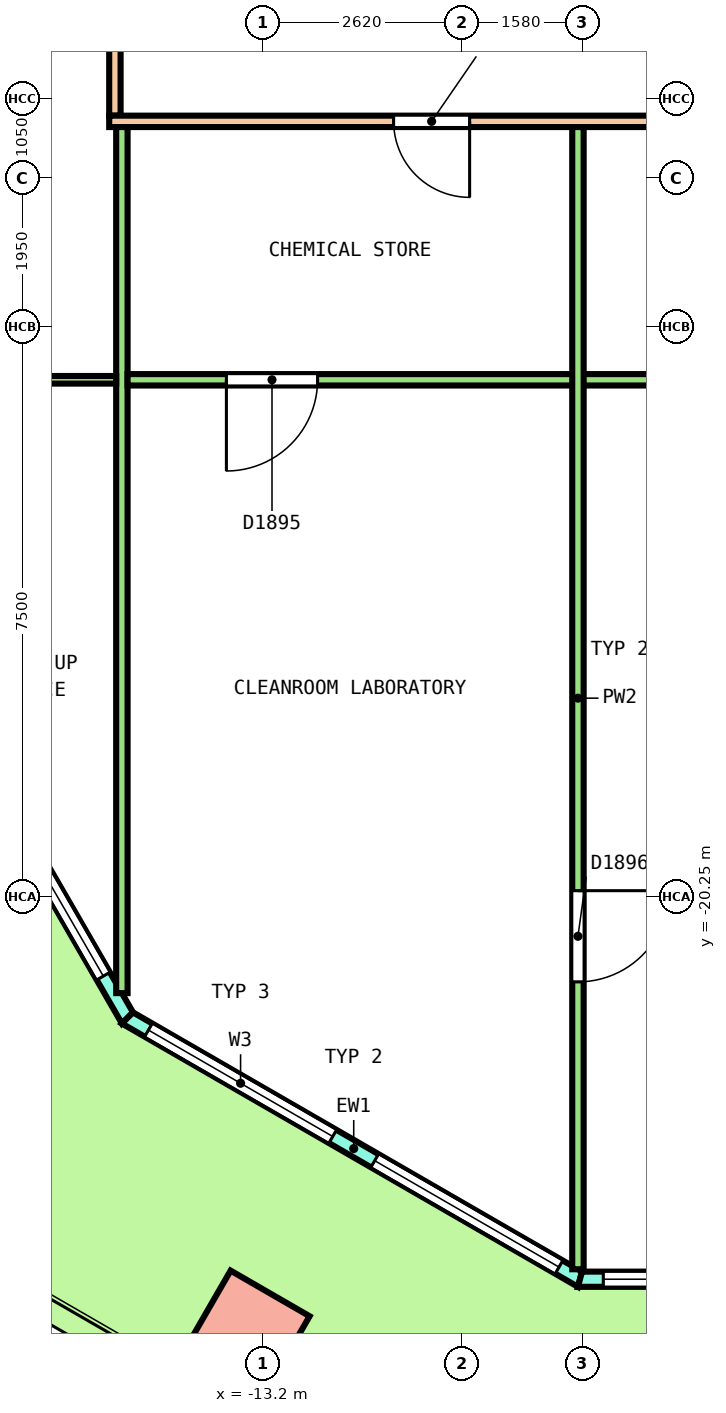
"""IFC4 building model, lengths in metres.
Left out: names, types, materials, properties, quantities, classifications, styles, units other than length and angle.
Written with IfcOpenShell. Run it as: python <this file> out.ifc"""

import sys

from ifc_helpers import new_model, si_unit, direction, frame, frame_2d, origin, origin_2d, place, context, subcontext, project, spatial, polyline, rectangle, outline, extrude, element, fill, save


model = new_model("IFC4")
c1 = context("Model", 3, precision=1e-05, world=origin(), true_north=direction((0.0, 1.0)))
c2 = subcontext(c1, "Body", "Model", "MODEL_VIEW")
j1 = project(units=[si_unit("LENGTHUNIT", "METRE"), si_unit("PLANEANGLEUNIT", "RADIAN")], contexts=[c1])
p1 = place(None, origin())
s1 = spatial("IfcSite", under=j1, at=p1, CompositionType="ELEMENT")
p2 = place(p1, origin())
s2 = spatial("IfcBuilding", under=s1, at=p2, CompositionType="ELEMENT")
p3 = place(p2, frame((0.0, 0.0, 189.2)))
s3 = spatial("IfcBuildingStorey", under=s2, at=p3, CompositionType="ELEMENT", Elevation=189.2)
p4 = place(p3, frame((-13.408, -25.989, 0.0), z_axis=(0.0, 0.0, 1.0), x_axis=(0.866025403784, -0.5, 0.0)))
e1 = element("IfcColumn", 1, at=p4, inside=s3, PredefinedType="COLUMN", context=c2, shape_type="SweptSolid", body=[
    extrude(rectangle(XDim=1.2, YDim=1.2, at=origin_2d()), origin(), (0.0, 0.0, 1.0), 4.05),
])
p5 = place(p3, frame((-26.411, -2.055, 0.0), z_axis=(0.0, 0.0, 1.0), x_axis=(0.50000204422, -0.86602422355, 0.0)))
e2 = element("IfcWall", 2, at=p5, inside=s3, PredefinedType="SOLIDWALL", context=c2, shape_type="SweptSolid", body=[
    extrude(outline(polyline([(-0.027, -0.1), (1.014, -0.1), (2.055, -0.1), (3.097, -0.1), (4.138, -0.1), (5.179, -0.1), (6.22, -0.1), (7.261, -0.1), (8.303, -0.1), (9.344, -0.1), (10.385, -0.1), (11.426, -0.1), (12.468, -0.1), (13.509, -0.1), (14.55, -0.1), (15.591, -0.1), (16.632, -0.1), (17.673, -0.1), (18.715, -0.1), (19.756, -0.1), (20.797, -0.1), (21.838, -0.1), (22.879, -0.1), (22.826, 0.1), (21.789, 0.1), (20.753, 0.1), (19.717, 0.1), (18.68, 0.1), (17.644, 0.1), (16.608, 0.1), (15.572, 0.1), (14.535, 0.1), (13.499, 0.1), (12.463, 0.1), (11.426, 0.1), (10.39, 0.1), (9.354, 0.1), (8.317, 0.1), (7.281, 0.1), (6.245, 0.1), (5.208, 0.1), (4.172, 0.1), (3.136, 0.1), (2.099, 0.1), (1.063, 0.1), (0.027, 0.1), (-0.027, -0.1)])), origin(), (0.0, 0.0, 1.0), 4.1),
])
p6 = place(p5, frame((0.635, 0.0, 0.1)))
e3 = element("IfcOpeningElement", 3, at=p6, cuts=e2, PredefinedType="OPENING", context=c2, shape_type="SweptSolid", body=[
    extrude(rectangle(XDim=3.3, YDim=2.9, at=frame_2d((1.65, 1.45))), frame((0.0, 0.11, 0.0), z_axis=(0.0, -1.0, 0.0), x_axis=(1.0, 0.0, 0.0)), (0.0, 0.0, 1.0), 0.22),
])
p7 = place(p5, frame((5.206, 0.0, 0.1)))
e4 = element("IfcOpeningElement", 4, at=p7, cuts=e2, PredefinedType="OPENING", context=c2, shape_type="SweptSolid", body=[
    extrude(rectangle(XDim=3.3, YDim=2.9, at=frame_2d((1.65, 1.45))), frame((0.0, 0.11, 0.0), z_axis=(0.0, -1.0, 0.0), x_axis=(1.0, 0.0, 0.0)), (0.0, 0.0, 1.0), 0.22),
])
p8 = place(p5, frame((10.526, 0.0, 0.0)))
e5 = element("IfcOpeningElement", 5, at=p8, cuts=e2, PredefinedType="OPENING", context=c2, shape_type="SweptSolid", body=[
    extrude(rectangle(XDim=1.8, YDim=2.4, at=frame_2d((0.9, 1.2))), frame((0.0, 0.11, 0.0), z_axis=(0.0, -1.0, 0.0), x_axis=(1.0, 0.0, 0.0)), (0.0, 0.0, 1.0), 0.22),
])
p9 = place(p5, frame((10.526, 0.0, 2.55)))
e6 = element("IfcOpeningElement", 6, at=p9, cuts=e2, PredefinedType="OPENING", context=c2, shape_type="SweptSolid", body=[
    extrude(rectangle(XDim=1.8, YDim=0.45, at=frame_2d((0.9, 0.225))), frame((0.0, 0.11, 0.0), z_axis=(0.0, -1.0, 0.0), x_axis=(1.0, 0.0, 0.0)), (0.0, 0.0, 1.0), 0.22),
])
p10 = place(p5, frame((14.347, 0.0, 0.1)))
e7 = element("IfcOpeningElement", 7, at=p10, cuts=e2, PredefinedType="OPENING", context=c2, shape_type="SweptSolid", body=[
    extrude(rectangle(XDim=3.3, YDim=2.9, at=frame_2d((1.65, 1.45))), frame((0.0, 0.11, 0.0), z_axis=(0.0, -1.0, 0.0), x_axis=(1.0, 0.0, 0.0)), (0.0, 0.0, 1.0), 0.22),
])
p11 = place(p5, frame((18.917, 0.0, 0.1)))
e8 = element("IfcOpeningElement", 8, at=p11, cuts=e2, PredefinedType="OPENING", context=c2, shape_type="SweptSolid", body=[
    extrude(rectangle(XDim=3.3, YDim=2.9, at=frame_2d((1.65, 1.45))), frame((0.0, 0.11, 0.0), z_axis=(0.0, -1.0, 0.0), x_axis=(1.0, 0.0, 0.0)), (0.0, 0.0, 1.0), 0.22),
])
p12 = place(p3, frame((-14.985, -21.845, 0.0), z_axis=(0.0, 0.0, 1.0), x_axis=(0.866029458321, -0.49999297727, 0.0)))
e9 = element("IfcWall", 9, at=p12, inside=s3, PredefinedType="SOLIDWALL", context=c2, shape_type="SweptSolid", body=[
    extrude(outline(polyline([(-0.027, -0.1), (1.128, -0.1), (2.282, -0.1), (3.437, -0.1), (4.592, -0.1), (5.747, -0.1), (6.901, -0.1), (6.848, 0.1), (5.711, 0.1), (4.574, 0.1), (3.437, 0.1), (2.301, 0.1), (1.164, 0.1), (0.027, 0.1), (-0.027, -0.1)])), origin(), (0.0, 0.0, 1.0), 4.1),
])
p13 = place(p12, frame((0.319, 0.0, 0.1)))
e10 = element("IfcOpeningElement", 10, at=p13, cuts=e9, PredefinedType="OPENING", context=c2, shape_type="SweptSolid", body=[
    extrude(rectangle(XDim=2.8, YDim=2.9, at=frame_2d((1.4, 1.45))), frame((0.0, 0.11, 0.0), z_axis=(0.0, -1.0, 0.0), x_axis=(1.0, 0.0, 0.0)), (0.0, 0.0, 1.0), 0.22),
])
p14 = place(p12, frame((3.756, 0.0, 0.1)))
e11 = element("IfcOpeningElement", 11, at=p14, cuts=e9, PredefinedType="OPENING", context=c2, shape_type="SweptSolid", body=[
    extrude(rectangle(XDim=2.8, YDim=2.9, at=frame_2d((1.4, 1.45))), frame((0.0, 0.11, 0.0), z_axis=(0.0, -1.0, 0.0), x_axis=(1.0, 0.0, 0.0)), (0.0, 0.0, 1.0), 0.22),
])
p15 = place(p3, frame((-9.031, -25.283, 0.0), z_axis=(0.0, 0.0, 1.0), x_axis=(1.0, 0.0, 0.0)))
e12 = element("IfcWall", 12, at=p15, inside=s3, PredefinedType="SOLIDWALL", context=c2, shape_type="SweptSolid", body=[
    extrude(outline(polyline([(-0.027, -0.1), (0.979, -0.1), (1.986, -0.1), (2.992, -0.1), (3.999, -0.1), (5.005, -0.1), (6.012, -0.1), (7.018, -0.1), (8.025, -0.1), (9.031, -0.1), (10.038, -0.1), (11.044, -0.1), (12.051, -0.1), (13.057, -0.1), (14.063, -0.1), (15.07, -0.1), (16.076, -0.1), (17.083, -0.1), (18.089, -0.1), (18.036, 0.1), (17.035, 0.1), (16.035, 0.1), (15.034, 0.1), (14.034, 0.1), (13.033, 0.1), (12.033, 0.1), (11.032, 0.1), (10.032, 0.1), (9.031, 0.1), (8.031, 0.1), (7.03, 0.1), (6.03, 0.1), (5.029, 0.1), (4.029, 0.1), (3.028, 0.1), (2.028, 0.1), (1.027, 0.1), (0.027, 0.1), (-0.027, -0.1)])), origin(), (0.0, 0.0, 1.0), 4.1),
])
p16 = place(p15, frame((0.306, 0.0, 0.1)))
e13 = element("IfcOpeningElement", 13, at=p16, cuts=e12, PredefinedType="OPENING", context=c2, shape_type="SweptSolid", body=[
    extrude(rectangle(XDim=3.0, YDim=2.9, at=frame_2d((1.5, 1.45))), frame((0.0, 0.11, 0.0), z_axis=(0.0, -1.0, 0.0), x_axis=(1.0, 0.0, 0.0)), (0.0, 0.0, 1.0), 0.22),
])
p17 = place(p15, frame((3.919, 0.0, 0.1)))
e14 = element("IfcOpeningElement", 14, at=p17, cuts=e12, PredefinedType="OPENING", context=c2, shape_type="SweptSolid", body=[
    extrude(rectangle(XDim=3.0, YDim=2.9, at=frame_2d((1.5, 1.45))), frame((0.0, 0.11, 0.0), z_axis=(0.0, -1.0, 0.0), x_axis=(1.0, 0.0, 0.0)), (0.0, 0.0, 1.0), 0.22),
])
p18 = place(p15, frame((8.131, 0.0, 0.0)))
e15 = element("IfcOpeningElement", 15, at=p18, cuts=e12, PredefinedType="OPENING", context=c2, shape_type="SweptSolid", body=[
    extrude(rectangle(XDim=1.8, YDim=2.4, at=frame_2d((0.9, 1.2))), frame((0.0, 0.11, 0.0), z_axis=(0.0, -1.0, 0.0), x_axis=(1.0, 0.0, 0.0)), (0.0, 0.0, 1.0), 0.22),
])
p19 = place(p15, frame((8.131, 0.0, 2.55)))
e16 = element("IfcOpeningElement", 16, at=p19, cuts=e12, PredefinedType="OPENING", context=c2, shape_type="SweptSolid", body=[
    extrude(rectangle(XDim=1.8, YDim=0.45, at=frame_2d((0.9, 0.225))), frame((0.0, 0.11, 0.0), z_axis=(0.0, -1.0, 0.0), x_axis=(1.0, 0.0, 0.0)), (0.0, 0.0, 1.0), 0.22),
])
p20 = place(p15, frame((11.144, 0.0, 0.1)))
e17 = element("IfcOpeningElement", 17, at=p20, cuts=e12, PredefinedType="OPENING", context=c2, shape_type="SweptSolid", body=[
    extrude(rectangle(XDim=3.0, YDim=2.9, at=frame_2d((1.5, 1.45))), frame((0.0, 0.11, 0.0), z_axis=(0.0, -1.0, 0.0), x_axis=(1.0, 0.0, 0.0)), (0.0, 0.0, 1.0), 0.22),
])
p21 = place(p15, frame((14.756, 0.0, 0.1)))
e18 = element("IfcOpeningElement", 18, at=p21, cuts=e12, PredefinedType="OPENING", context=c2, shape_type="SweptSolid", body=[
    extrude(rectangle(XDim=3.0, YDim=2.9, at=frame_2d((1.5, 1.45))), frame((0.0, 0.11, 0.0), z_axis=(0.0, -1.0, 0.0), x_axis=(1.0, 0.0, 0.0)), (0.0, 0.0, 1.0), 0.22),
])
p22 = place(p3, frame((-15.15, -9.975, 0.0), z_axis=(0.0, 0.0, 1.0), x_axis=(0.0, 1.0, 0.0)))
e19 = element("IfcWall", 19, at=p22, inside=s3, PredefinedType="PARTITIONING", context=c2, shape_type="SweptSolid", body=[
    extrude(rectangle(XDim=8.701, YDim=0.15, at=frame_2d((4.35, 0.0))), origin(), (0.0, 0.0, 1.0), 3.05),
])
p23 = place(p22, frame((1.771, 0.0, 0.0)))
e20 = element("IfcOpeningElement", 20, at=p23, cuts=e19, PredefinedType="OPENING", context=c2, shape_type="SweptSolid", body=[
    extrude(rectangle(XDim=1.0, YDim=2.1, at=frame_2d((0.5, 1.05))), frame((0.0, 0.085, 0.0), z_axis=(0.0, -1.0, 0.0), x_axis=(1.0, 0.0, 0.0)), (0.0, 0.0, 1.0), 0.17),
])
p24 = place(p3, frame((-15.225, -10.05, 0.0), z_axis=(0.0, 0.0, 1.0), x_axis=(1.0, 0.0, 0.0)))
e21 = element("IfcWall", 21, at=p24, inside=s3, PredefinedType="PARTITIONING", context=c2, shape_type="SweptSolid", body=[
    extrude(rectangle(XDim=30.325, YDim=0.15, at=frame_2d((15.163, 0.0))), origin(), (0.0, 0.0, 1.0), 3.05),
])
p25 = place(p24, frame((3.742, 0.0, 0.0)))
e22 = element("IfcOpeningElement", 22, at=p25, cuts=e21, PredefinedType="OPENING", context=c2, shape_type="SweptSolid", body=[
    extrude(rectangle(XDim=1.0, YDim=2.1, at=frame_2d((0.5, 1.05))), frame((0.0, 0.085, 0.0), z_axis=(0.0, -1.0, 0.0), x_axis=(1.0, 0.0, 0.0)), (0.0, 0.0, 1.0), 0.17),
])
p26 = place(p24, frame((12.193, 0.0, 0.0)))
e23 = element("IfcOpeningElement", 23, at=p26, cuts=e21, PredefinedType="OPENING", context=c2, shape_type="SweptSolid", body=[
    extrude(rectangle(XDim=1.2, YDim=2.1, at=frame_2d((0.6, 1.05))), frame((0.0, 0.085, 0.0), z_axis=(0.0, -1.0, 0.0), x_axis=(1.0, 0.0, 0.0)), (0.0, 0.0, 1.0), 0.17),
])
p27 = place(p24, frame((26.829, 0.0, 0.0)))
e24 = element("IfcOpeningElement", 24, at=p27, cuts=e21, PredefinedType="OPENING", context=c2, shape_type="SweptSolid", body=[
    extrude(rectangle(XDim=1.0, YDim=2.1, at=frame_2d((0.5, 1.05))), frame((0.0, 0.085, 0.0), z_axis=(0.0, -1.0, 0.0), x_axis=(1.0, 0.0, 0.0)), (0.0, 0.0, 1.0), 0.17),
])
p28 = place(p3, frame((-15.058, -21.519, 0.0), z_axis=(0.0, 0.0, 1.0), x_axis=(0.0, 1.0, 0.0)))
e25 = element("IfcWall", 25, at=p28, inside=s3, PredefinedType="PARTITIONING", context=c2, shape_type="SweptSolid", body=[
    extrude(rectangle(XDim=11.394, YDim=0.15, at=frame_2d((5.697, 0.0))), origin(), (0.0, 0.0, 1.0), 3.05),
])
p29 = place(p3, frame((-14.983, -13.45, 0.0), z_axis=(0.0, 0.0, 1.0), x_axis=(1.0, 0.0, 0.0)))
e26 = element("IfcWall", 26, at=p29, inside=s3, PredefinedType="PARTITIONING", context=c2, shape_type="SweptSolid", body=[
    extrude(rectangle(XDim=31.004, YDim=0.15, at=frame_2d((15.502, 0.0))), origin(), (0.0, 0.0, 1.0), 3.05),
])
p30 = place(p29, frame((1.3, 0.0, 0.0)))
e27 = element("IfcOpeningElement", 27, at=p30, cuts=e26, PredefinedType="OPENING", context=c2, shape_type="SweptSolid", body=[
    extrude(rectangle(XDim=1.2, YDim=2.1, at=frame_2d((0.6, 1.05))), frame((0.0, 0.085, 0.0), z_axis=(0.0, -1.0, 0.0), x_axis=(1.0, 0.0, 0.0)), (0.0, 0.0, 1.0), 0.17),
])
p31 = place(p3, frame((-9.058, -25.152, 0.0), z_axis=(0.0, 0.0, 1.0), x_axis=(0.0, 1.0, 0.0)))
e28 = element("IfcWall", 28, at=p31, inside=s3, PredefinedType="PARTITIONING", context=c2, shape_type="SweptSolid", body=[
    extrude(rectangle(XDim=15.027, YDim=0.15, at=frame_2d((7.513, 0.0))), origin(), (0.0, 0.0, 1.0), 3.05),
])
p32 = place(p31, frame((3.781, 0.0, 0.0)))
e29 = element("IfcOpeningElement", 29, at=p32, cuts=e28, PredefinedType="OPENING", context=c2, shape_type="SweptSolid", body=[
    extrude(rectangle(XDim=1.2, YDim=2.1, at=frame_2d((0.6, 1.05))), frame((0.0, 0.085, 0.0), z_axis=(0.0, -1.0, 0.0), x_axis=(1.0, 0.0, 0.0)), (0.0, 0.0, 1.0), 0.17),
])
p33 = place(p3, frame((-18.5, -13.45, 0.0), z_axis=(0.0, 0.0, 1.0), x_axis=(1.0, 0.0, 0.0)))
e30 = element("IfcWall", 30, at=p33, inside=s3, PredefinedType="PARTITIONING", context=c2, shape_type="SweptSolid", body=[
    extrude(rectangle(XDim=3.367, YDim=0.1, at=frame_2d((1.684, 0.0))), origin(), (0.0, 0.0, 1.0), 4.1),
])
p34 = place(p11, origin())
e31 = element("IfcWindow", 31, at=p34, inside=s3, PartitioningType="SINGLE_PANEL", PredefinedType="WINDOW", context=c2, shape_type="SweptSolid", body=[
    extrude(rectangle(XDim=3.3, YDim=2.9, at=frame_2d((1.65, 1.45))), frame((0.0, 0.03, 0.0), z_axis=(0.0, -1.0, 0.0), x_axis=(1.0, 0.0, 0.0)), (0.0, 0.0, 1.0), 0.06),
])
fill(e8, e31)
p35 = place(p13, origin())
e32 = element("IfcWindow", 32, at=p35, inside=s3, PartitioningType="SINGLE_PANEL", PredefinedType="WINDOW", context=c2, shape_type="SweptSolid", body=[
    extrude(rectangle(XDim=2.8, YDim=2.9, at=frame_2d((1.4, 1.45))), frame((0.0, 0.03, 0.0), z_axis=(0.0, -1.0, 0.0), x_axis=(1.0, 0.0, 0.0)), (0.0, 0.0, 1.0), 0.06),
])
fill(e10, e32)
p36 = place(p14, origin())
e33 = element("IfcWindow", 33, at=p36, inside=s3, PartitioningType="SINGLE_PANEL", PredefinedType="WINDOW", context=c2, shape_type="SweptSolid", body=[
    extrude(rectangle(XDim=2.8, YDim=2.9, at=frame_2d((1.4, 1.45))), frame((0.0, 0.03, 0.0), z_axis=(0.0, -1.0, 0.0), x_axis=(1.0, 0.0, 0.0)), (0.0, 0.0, 1.0), 0.06),
])
fill(e11, e33)
p37 = place(p16, origin())
e34 = element("IfcWindow", 34, at=p37, inside=s3, PartitioningType="SINGLE_PANEL", PredefinedType="WINDOW", context=c2, shape_type="SweptSolid", body=[
    extrude(rectangle(XDim=3.0, YDim=2.9, at=frame_2d((1.5, 1.45))), frame((0.0, 0.03, 0.0), z_axis=(0.0, -1.0, 0.0), x_axis=(1.0, 0.0, 0.0)), (0.0, 0.0, 1.0), 0.06),
])
fill(e13, e34)
p38 = place(p25, origin())
e35 = element("IfcDoor", 35, at=p38, inside=s3, OperationType="SINGLE_SWING_RIGHT", PredefinedType="DOOR", context=c2, shape_type="SweptSolid", body=[
    extrude(rectangle(XDim=1.0, YDim=2.1, at=frame_2d((0.5, 1.05))), frame((0.0, 0.025, 0.0), z_axis=(0.0, -1.0, 0.0), x_axis=(1.0, 0.0, 0.0)), (0.0, 0.0, 1.0), 0.05),
])
fill(e22, e35)
p39 = place(p30, origin())
e36 = element("IfcDoor", 36, at=p39, inside=s3, OperationType="DOUBLE_DOOR_SINGLE_SWING", PredefinedType="DOOR", context=c2, shape_type="SweptSolid", body=[
    extrude(rectangle(XDim=1.2, YDim=2.1, at=frame_2d((0.6, 1.05))), frame((0.0, 0.025, 0.0), z_axis=(0.0, -1.0, 0.0), x_axis=(1.0, 0.0, 0.0)), (0.0, 0.0, 1.0), 0.05),
])
fill(e27, e36)
p40 = place(p32, origin())
e37 = element("IfcDoor", 37, at=p40, inside=s3, OperationType="DOUBLE_DOOR_SINGLE_SWING", PredefinedType="DOOR", context=c2, shape_type="SweptSolid", body=[
    extrude(rectangle(XDim=1.2, YDim=2.1, at=frame_2d((0.6, 1.05))), frame((0.0, 0.025, 0.0), z_axis=(0.0, -1.0, 0.0), x_axis=(1.0, 0.0, 0.0)), (0.0, 0.0, 1.0), 0.05),
])
fill(e29, e37)
save(model, sys.argv[1])
